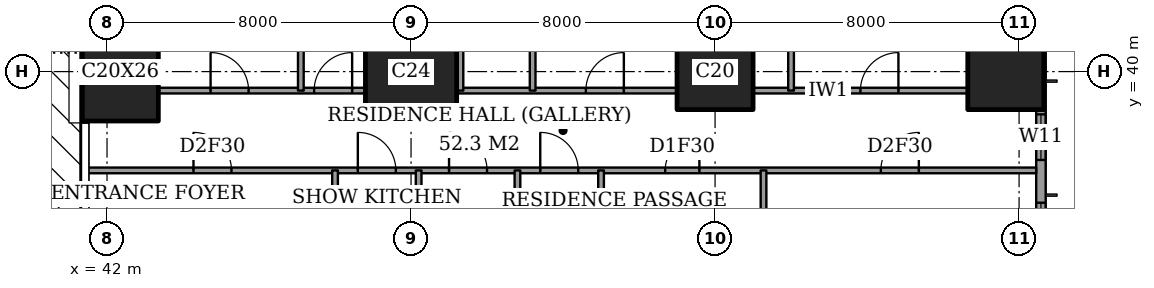
"""IFC4 building model, lengths in metres.
Left out: names, types, materials, properties, quantities, classifications, styles, units other than length and angle.
Written with IfcOpenShell. Run it as: python <this file> out.ifc"""

import sys

from ifc_helpers import new_model, si_unit, direction, frame, frame_2d, origin, origin_2d, place, context, subcontext, project, spatial, rectangle, extrude, element, fill, save


model = new_model("IFC4")
c1 = context("Model", 3, precision=1e-05, world=origin(), true_north=direction((0.0, 1.0)))
c2 = subcontext(c1, "Body", "Model", "MODEL_VIEW")
j1 = project(units=[si_unit("LENGTHUNIT", "METRE"), si_unit("PLANEANGLEUNIT", "RADIAN")], contexts=[c1])
p1 = place(None, origin())
s1 = spatial("IfcSite", under=j1, at=p1, CompositionType="ELEMENT")
p2 = place(p1, origin())
s2 = spatial("IfcBuilding", under=s1, at=p2, CompositionType="ELEMENT")
p3 = place(p2, frame((0.0, 0.0, 96.2)))
s3 = spatial("IfcBuildingStorey", under=s2, at=p3, CompositionType="ELEMENT", Elevation=96.2)
p4 = place(p3, frame((42.35, 40.0, 0.0), z_axis=(0.0, 0.0, 1.0), x_axis=(1.0, 0.0, 0.0)))
e1 = element("IfcColumn", 1, at=p4, inside=s3, PredefinedType="COLUMN", context=c2, shape_type="SweptSolid", body=[
    extrude(rectangle(XDim=2.0, YDim=2.6, at=origin_2d()), origin(), (0.0, 0.0, 1.0), 3.6),
])
p5 = place(p3, frame((50.0, 40.0, 0.0), z_axis=(0.0, 0.0, 1.0), x_axis=(1.0, 0.0, 0.0)))
e2 = element("IfcColumn", 2, at=p5, inside=s3, PredefinedType="COLUMN", context=c2, shape_type="SweptSolid", body=[
    extrude(rectangle(XDim=2.4, YDim=2.4, at=origin_2d()), origin(), (0.0, 0.0, 1.0), 3.6),
])
for number, where, z_axis, x_axis in (
    (3, (58.0, 40.0, 0.0), (0.0, 0.0, 1.0), (1.0, 0.0, 0.0)),
    (4, (65.65, 40.0, 0.0), (0.0, 0.0, 1.0), (1.0, 0.0, 0.0)),
):
    element("IfcColumn", number, at=place(p3, frame(where, z_axis=z_axis, x_axis=x_axis)), inside=s3, PredefinedType="COLUMN", context=c2, shape_type="SweptSolid", body=[
        extrude(rectangle(XDim=2.0, YDim=2.0, at=origin_2d()), origin(), (0.0, 0.0, 1.0), 3.6),
    ])
p6 = place(p3, frame((66.575, 3.175, 0.0), z_axis=(0.0, 0.0, 1.0), x_axis=(0.0, 1.0, 0.0)))
e5 = element("IfcWall", 5, at=p6, inside=s3, PredefinedType="SOLIDWALL", context=c2, shape_type="SweptSolid", body=[
    extrude(rectangle(XDim=41.65, YDim=0.25, at=frame_2d((20.825, 0.0))), origin(), (0.0, 0.0, 1.0), 3.6),
])
p7 = place(p6, frame((0.775, 0.0, 0.4)))
e6 = element("IfcOpeningElement", 6, at=p7, cuts=e5, PredefinedType="OPENING", context=c2, shape_type="SweptSolid", body=[
    extrude(rectangle(XDim=2.4, YDim=2.2, at=frame_2d((1.2, 1.1))), frame((0.0, 0.135, 0.0), z_axis=(0.0, -1.0, 0.0), x_axis=(1.0, 0.0, 0.0)), (0.0, 0.0, 1.0), 0.27),
])
p8 = place(p6, frame((6.1, 0.0, 0.4)))
e7 = element("IfcOpeningElement", 7, at=p8, cuts=e5, PredefinedType="OPENING", context=c2, shape_type="SweptSolid", body=[
    extrude(rectangle(XDim=1.2, YDim=2.2, at=frame_2d((0.6, 1.1))), frame((0.0, 0.135, 0.0), z_axis=(0.0, -1.0, 0.0), x_axis=(1.0, 0.0, 0.0)), (0.0, 0.0, 1.0), 0.27),
])
p9 = place(p6, frame((8.275, 0.0, 0.4)))
e8 = element("IfcOpeningElement", 8, at=p9, cuts=e5, PredefinedType="OPENING", context=c2, shape_type="SweptSolid", body=[
    extrude(rectangle(XDim=2.4, YDim=2.2, at=frame_2d((1.2, 1.1))), frame((0.0, 0.135, 0.0), z_axis=(0.0, -1.0, 0.0), x_axis=(1.0, 0.0, 0.0)), (0.0, 0.0, 1.0), 0.27),
])
p10 = place(p6, frame((15.775, 0.0, 0.4)))
e9 = element("IfcOpeningElement", 9, at=p10, cuts=e5, PredefinedType="OPENING", context=c2, shape_type="SweptSolid", body=[
    extrude(rectangle(XDim=2.4, YDim=2.2, at=frame_2d((1.2, 1.1))), frame((0.0, 0.135, 0.0), z_axis=(0.0, -1.0, 0.0), x_axis=(1.0, 0.0, 0.0)), (0.0, 0.0, 1.0), 0.27),
])
p11 = place(p6, frame((23.475, 0.0, 0.4)))
e10 = element("IfcOpeningElement", 10, at=p11, cuts=e5, PredefinedType="OPENING", context=c2, shape_type="SweptSolid", body=[
    extrude(rectangle(XDim=2.4, YDim=2.2, at=frame_2d((1.2, 1.1))), frame((0.0, 0.135, 0.0), z_axis=(0.0, -1.0, 0.0), x_axis=(1.0, 0.0, 0.0)), (0.0, 0.0, 1.0), 0.27),
])
p12 = place(p6, frame((30.975, 0.0, 0.4)))
e11 = element("IfcOpeningElement", 11, at=p12, cuts=e5, PredefinedType="OPENING", context=c2, shape_type="SweptSolid", body=[
    extrude(rectangle(XDim=2.4, YDim=2.2, at=frame_2d((1.2, 1.1))), frame((0.0, 0.135, 0.0), z_axis=(0.0, -1.0, 0.0), x_axis=(1.0, 0.0, 0.0)), (0.0, 0.0, 1.0), 0.27),
])
p13 = place(p6, frame((34.5, 0.0, 0.4)))
e12 = element("IfcOpeningElement", 12, at=p13, cuts=e5, PredefinedType="OPENING", context=c2, shape_type="SweptSolid", body=[
    extrude(rectangle(XDim=1.2, YDim=2.2, at=frame_2d((0.6, 1.1))), frame((0.0, 0.135, 0.0), z_axis=(0.0, -1.0, 0.0), x_axis=(1.0, 0.0, 0.0)), (0.0, 0.0, 1.0), 0.27),
])
p14 = place(p6, frame((38.475, 0.0, 0.4)))
e13 = element("IfcOpeningElement", 13, at=p14, cuts=e5, PredefinedType="OPENING", context=c2, shape_type="SweptSolid", body=[
    extrude(rectangle(XDim=2.4, YDim=2.2, at=frame_2d((1.2, 1.1))), frame((0.0, 0.135, 0.0), z_axis=(0.0, -1.0, 0.0), x_axis=(1.0, 0.0, 0.0)), (0.0, 0.0, 1.0), 0.27),
])
p15 = place(p3, frame((41.439, 37.4, 0.0), z_axis=(0.0, 0.0, 1.0), x_axis=(1.0, 0.0, 0.0)))
e14 = element("IfcWall", 14, at=p15, inside=s3, PredefinedType="PARTITIONING", context=c2, shape_type="SweptSolid", body=[
    extrude(rectangle(XDim=25.011, YDim=0.15, at=frame_2d((12.505, 0.0))), origin(), (0.0, 0.0, 1.0), 3.35),
])
p16 = place(p15, frame((11.961, 0.0, 0.0)))
e15 = element("IfcOpeningElement", 15, at=p16, cuts=e14, PredefinedType="OPENING", context=c2, shape_type="SweptSolid", body=[
    extrude(rectangle(XDim=1.0, YDim=2.1, at=frame_2d((0.5, 1.05))), frame((0.0, 0.085, 0.0), z_axis=(0.0, -1.0, 0.0), x_axis=(1.0, 0.0, 0.0)), (0.0, 0.0, 1.0), 0.17),
])
p17 = place(p15, frame((20.924, 0.0, 0.0)))
e16 = element("IfcOpeningElement", 16, at=p17, cuts=e14, PredefinedType="OPENING", context=c2, shape_type="SweptSolid", body=[
    extrude(rectangle(XDim=1.0, YDim=2.1, at=frame_2d((0.5, 1.05))), frame((0.0, 0.085, 0.0), z_axis=(0.0, -1.0, 0.0), x_axis=(1.0, 0.0, 0.0)), (0.0, 0.0, 1.0), 0.17),
])
p18 = place(p15, frame((15.249, 0.0, 0.0)))
e17 = element("IfcOpeningElement", 17, at=p18, cuts=e14, PredefinedType="OPENING", context=c2, shape_type="SweptSolid", body=[
    extrude(rectangle(XDim=0.9, YDim=2.1, at=frame_2d((0.45, 1.05))), frame((0.0, 0.085, 0.0), z_axis=(0.0, -1.0, 0.0), x_axis=(1.0, 0.0, 0.0)), (0.0, 0.0, 1.0), 0.17),
])
p19 = place(p15, frame((9.561, 0.0, 0.0)))
e18 = element("IfcOpeningElement", 18, at=p19, cuts=e14, PredefinedType="OPENING", context=c2, shape_type="SweptSolid", body=[
    extrude(rectangle(XDim=1.0, YDim=2.1, at=frame_2d((0.5, 1.05))), frame((0.0, 0.085, 0.0), z_axis=(0.0, -1.0, 0.0), x_axis=(1.0, 0.0, 0.0)), (0.0, 0.0, 1.0), 0.17),
])
p20 = place(p15, frame((7.161, 0.0, 0.0)))
e19 = element("IfcOpeningElement", 19, at=p20, cuts=e14, PredefinedType="OPENING", context=c2, shape_type="SweptSolid", body=[
    extrude(rectangle(XDim=1.0, YDim=2.1, at=frame_2d((0.5, 1.05))), frame((0.0, 0.085, 0.0), z_axis=(0.0, -1.0, 0.0), x_axis=(1.0, 0.0, 0.0)), (0.0, 0.0, 1.0), 0.17),
])
p21 = place(p15, frame((2.836, 0.0, 0.0)))
e20 = element("IfcOpeningElement", 20, at=p21, cuts=e14, PredefinedType="OPENING", context=c2, shape_type="SweptSolid", body=[
    extrude(rectangle(XDim=1.0, YDim=2.1, at=frame_2d((0.5, 1.05))), frame((0.0, 0.085, 0.0), z_axis=(0.0, -1.0, 0.0), x_axis=(1.0, 0.0, 0.0)), (0.0, 0.0, 1.0), 0.17),
])
p22 = place(p3, frame((43.35, 39.5, 0.0), z_axis=(0.0, 0.0, 1.0), x_axis=(1.0, 0.0, 0.0)))
e21 = element("IfcWall", 21, at=p22, inside=s3, PredefinedType="PARTITIONING", context=c2, shape_type="SweptSolid", body=[
    extrude(rectangle(XDim=5.45, YDim=0.15, at=frame_2d((2.725, 0.0))), origin(), (0.0, 0.0, 1.0), 3.35),
])
p23 = place(p22, frame((4.1, 0.0, 0.0)))
e22 = element("IfcOpeningElement", 22, at=p23, cuts=e21, PredefinedType="OPENING", context=c2, shape_type="SweptSolid", body=[
    extrude(rectangle(XDim=1.0, YDim=2.1, at=frame_2d((0.5, 1.05))), frame((0.0, 0.085, 0.0), z_axis=(0.0, -1.0, 0.0), x_axis=(1.0, 0.0, 0.0)), (0.0, 0.0, 1.0), 0.17),
])
p24 = place(p22, frame((1.375, 0.0, 0.0)))
e23 = element("IfcOpeningElement", 23, at=p24, cuts=e21, PredefinedType="OPENING", context=c2, shape_type="SweptSolid", body=[
    extrude(rectangle(XDim=1.0, YDim=2.1, at=frame_2d((0.5, 1.05))), frame((0.0, 0.085, 0.0), z_axis=(0.0, -1.0, 0.0), x_axis=(1.0, 0.0, 0.0)), (0.0, 0.0, 1.0), 0.17),
])
p25 = place(p3, frame((51.2, 39.5, 0.0), z_axis=(0.0, 0.0, 1.0), x_axis=(1.0, 0.0, 0.0)))
e24 = element("IfcWall", 24, at=p25, inside=s3, PredefinedType="PARTITIONING", context=c2, shape_type="SweptSolid", body=[
    extrude(rectangle(XDim=5.8, YDim=0.15, at=frame_2d((2.9, 0.0))), origin(), (0.0, 0.0, 1.0), 3.35),
])
p26 = place(p25, frame((3.4, 0.0, 0.0)))
e25 = element("IfcOpeningElement", 25, at=p26, cuts=e24, PredefinedType="OPENING", context=c2, shape_type="SweptSolid", body=[
    extrude(rectangle(XDim=1.0, YDim=2.1, at=frame_2d((0.5, 1.05))), frame((0.0, 0.085, 0.0), z_axis=(0.0, -1.0, 0.0), x_axis=(1.0, 0.0, 0.0)), (0.0, 0.0, 1.0), 0.17),
])
p27 = place(p3, frame((59.0, 39.5, 0.0), z_axis=(0.0, 0.0, 1.0), x_axis=(1.0, 0.0, 0.0)))
e26 = element("IfcWall", 26, at=p27, inside=s3, PredefinedType="PARTITIONING", context=c2, shape_type="SweptSolid", body=[
    extrude(rectangle(XDim=5.65, YDim=0.15, at=frame_2d((2.825, 0.0))), origin(), (0.0, 0.0, 1.0), 3.35),
])
p28 = place(p27, frame((2.825, 0.0, 0.0)))
e27 = element("IfcOpeningElement", 27, at=p28, cuts=e26, PredefinedType="OPENING", context=c2, shape_type="SweptSolid", body=[
    extrude(rectangle(XDim=1.0, YDim=2.1, at=frame_2d((0.5, 1.05))), frame((0.0, 0.085, 0.0), z_axis=(0.0, -1.0, 0.0), x_axis=(1.0, 0.0, 0.0)), (0.0, 0.0, 1.0), 0.17),
])
p29 = place(p3, frame((47.1, 39.5, 0.0), z_axis=(0.0, 0.0, 1.0), x_axis=(0.0, 1.0, 0.0)))
e28 = element("IfcWall", 28, at=p29, inside=s3, PredefinedType="PARTITIONING", context=c2, shape_type="SweptSolid", body=[
    extrude(rectangle(XDim=8.95, YDim=0.15, at=frame_2d((4.475, 0.0))), origin(), (0.0, 0.0, 1.0), 3.35),
])
p30 = place(p3, frame((48.0, 28.0, 0.0), z_axis=(0.0, 0.0, 1.0), x_axis=(0.0, 1.0, 0.0)))
e29 = element("IfcWall", 29, at=p30, inside=s3, PredefinedType="PARTITIONING", context=c2, shape_type="SweptSolid", body=[
    extrude(rectangle(XDim=9.4, YDim=0.15, at=frame_2d((4.7, 0.0))), origin(), (0.0, 0.0, 1.0), 3.35),
])
p31 = place(p30, frame((0.5, 0.0, 0.0)))
e30 = element("IfcOpeningElement", 30, at=p31, cuts=e29, PredefinedType="OPENING", context=c2, shape_type="SweptSolid", body=[
    extrude(rectangle(XDim=1.0, YDim=2.1, at=frame_2d((0.5, 1.05))), frame((0.0, 0.085, 0.0), z_axis=(0.0, -1.0, 0.0), x_axis=(1.0, 0.0, 0.0)), (0.0, 0.0, 1.0), 0.17),
])
p32 = place(p3, frame((50.2, 33.2, 0.0), z_axis=(0.0, 0.0, 1.0), x_axis=(0.0, 1.0, 0.0)))
e31 = element("IfcWall", 31, at=p32, inside=s3, PredefinedType="PARTITIONING", context=c2, shape_type="SweptSolid", body=[
    extrude(rectangle(XDim=4.2, YDim=0.15, at=frame_2d((2.1, 0.0))), origin(), (0.0, 0.0, 1.0), 3.35),
])
p33 = place(p3, frame((51.3, 39.5, 0.0), z_axis=(0.0, 0.0, 1.0), x_axis=(0.0, 1.0, 0.0)))
e32 = element("IfcWall", 32, at=p33, inside=s3, PredefinedType="PARTITIONING", context=c2, shape_type="SweptSolid", body=[
    extrude(rectangle(XDim=8.95, YDim=0.15, at=frame_2d((4.475, 0.0))), origin(), (0.0, 0.0, 1.0), 3.35),
])
p34 = place(p33, frame((4.025, 0.0, 0.0)))
e33 = element("IfcOpeningElement", 33, at=p34, cuts=e32, PredefinedType="OPENING", context=c2, shape_type="SweptSolid", body=[
    extrude(rectangle(XDim=0.9, YDim=2.1, at=frame_2d((0.45, 1.05))), frame((0.0, 0.085, 0.0), z_axis=(0.0, -1.0, 0.0), x_axis=(1.0, 0.0, 0.0)), (0.0, 0.0, 1.0), 0.17),
])
p35 = place(p3, frame((52.8, 30.0, 0.0), z_axis=(0.0, 0.0, 1.0), x_axis=(0.0, 1.0, 0.0)))
e34 = element("IfcWall", 34, at=p35, inside=s3, PredefinedType="PARTITIONING", context=c2, shape_type="SweptSolid", body=[
    extrude(rectangle(XDim=7.4, YDim=0.15, at=frame_2d((3.7, 0.0))), origin(), (0.0, 0.0, 1.0), 3.35),
])
p36 = place(p3, frame((53.2, 39.5, 0.0), z_axis=(0.0, 0.0, 1.0), x_axis=(0.0, 1.0, 0.0)))
e35 = element("IfcWall", 35, at=p36, inside=s3, PredefinedType="PARTITIONING", context=c2, shape_type="SweptSolid", body=[
    extrude(rectangle(XDim=8.95, YDim=0.15, at=frame_2d((4.475, 0.0))), origin(), (0.0, 0.0, 1.0), 3.35),
])
p37 = place(p3, frame((55.0, 28.0, 0.0), z_axis=(0.0, 0.0, 1.0), x_axis=(0.0, 1.0, 0.0)))
e36 = element("IfcWall", 36, at=p37, inside=s3, PredefinedType="PARTITIONING", context=c2, shape_type="SweptSolid", body=[
    extrude(rectangle(XDim=9.4, YDim=0.15, at=frame_2d((4.7, 0.0))), origin(), (0.0, 0.0, 1.0), 3.35),
])
p38 = place(p37, frame((0.5, 0.0, 0.0)))
e37 = element("IfcOpeningElement", 37, at=p38, cuts=e36, PredefinedType="OPENING", context=c2, shape_type="SweptSolid", body=[
    extrude(rectangle(XDim=1.0, YDim=2.1, at=frame_2d((0.5, 1.05))), frame((0.0, 0.085, 0.0), z_axis=(0.0, -1.0, 0.0), x_axis=(1.0, 0.0, 0.0)), (0.0, 0.0, 1.0), 0.17),
])
p39 = place(p3, frame((59.275, 33.2, 0.0), z_axis=(0.0, 0.0, 1.0), x_axis=(0.0, 1.0, 0.0)))
e38 = element("IfcWall", 38, at=p39, inside=s3, PredefinedType="PARTITIONING", context=c2, shape_type="SweptSolid", body=[
    extrude(rectangle(XDim=4.2, YDim=0.15, at=frame_2d((2.1, 0.0))), origin(), (0.0, 0.0, 1.0), 3.35),
])
p40 = place(p3, frame((60.0, 39.5, 0.0), z_axis=(0.0, 0.0, 1.0), x_axis=(0.0, 1.0, 0.0)))
e39 = element("IfcWall", 39, at=p40, inside=s3, PredefinedType="PARTITIONING", context=c2, shape_type="SweptSolid", body=[
    extrude(rectangle(XDim=8.95, YDim=0.15, at=frame_2d((4.475, 0.0))), origin(), (0.0, 0.0, 1.0), 3.35),
])
p41 = place(p12, origin())
e40 = element("IfcWindow", 40, at=p41, inside=s3, PartitioningType="SINGLE_PANEL", PredefinedType="WINDOW", context=c2, shape_type="SweptSolid", body=[
    extrude(rectangle(XDim=2.4, YDim=2.2, at=frame_2d((1.2, 1.1))), frame((0.0, 0.03, 0.0), z_axis=(0.0, -1.0, 0.0), x_axis=(1.0, 0.0, 0.0)), (0.0, 0.0, 1.0), 0.06),
])
fill(e11, e40)
p42 = place(p13, origin())
e41 = element("IfcWindow", 41, at=p42, inside=s3, PartitioningType="SINGLE_PANEL", PredefinedType="WINDOW", context=c2, shape_type="SweptSolid", body=[
    extrude(rectangle(XDim=1.2, YDim=2.2, at=frame_2d((0.6, 1.1))), frame((0.0, 0.03, 0.0), z_axis=(0.0, -1.0, 0.0), x_axis=(1.0, 0.0, 0.0)), (0.0, 0.0, 1.0), 0.06),
])
fill(e12, e41)
p43 = place(p28, origin())
e42 = element("IfcDoor", 42, at=p43, inside=s3, OperationType="SINGLE_SWING_LEFT", PredefinedType="DOOR", context=c2, shape_type="SweptSolid", body=[
    extrude(rectangle(XDim=1.0, YDim=2.1, at=frame_2d((0.5, 1.05))), frame((0.0, 0.025, 0.0), z_axis=(0.0, -1.0, 0.0), x_axis=(1.0, 0.0, 0.0)), (0.0, 0.0, 1.0), 0.05),
])
fill(e27, e42)
p44 = place(p26, origin())
e43 = element("IfcDoor", 43, at=p44, inside=s3, OperationType="SINGLE_SWING_LEFT", PredefinedType="DOOR", context=c2, shape_type="SweptSolid", body=[
    extrude(rectangle(XDim=1.0, YDim=2.1, at=frame_2d((0.5, 1.05))), frame((0.0, 0.025, 0.0), z_axis=(0.0, -1.0, 0.0), x_axis=(1.0, 0.0, 0.0)), (0.0, 0.0, 1.0), 0.05),
])
fill(e25, e43)
p45 = place(p23, origin())
e44 = element("IfcDoor", 44, at=p45, inside=s3, OperationType="SINGLE_SWING_LEFT", PredefinedType="DOOR", context=c2, shape_type="SweptSolid", body=[
    extrude(rectangle(XDim=1.0, YDim=2.1, at=frame_2d((0.5, 1.05))), frame((0.0, 0.025, 0.0), z_axis=(0.0, -1.0, 0.0), x_axis=(1.0, 0.0, 0.0)), (0.0, 0.0, 1.0), 0.05),
])
fill(e22, e44)
p46 = place(p24, origin())
e45 = element("IfcDoor", 45, at=p46, inside=s3, OperationType="SINGLE_SWING_RIGHT", PredefinedType="DOOR", context=c2, shape_type="SweptSolid", body=[
    extrude(rectangle(XDim=1.0, YDim=2.1, at=frame_2d((0.5, 1.05))), frame((0.0, 0.025, 0.0), z_axis=(0.0, -1.0, 0.0), x_axis=(1.0, 0.0, 0.0)), (0.0, 0.0, 1.0), 0.05),
])
fill(e23, e45)
p47 = place(p16, origin())
e46 = element("IfcDoor", 46, at=p47, inside=s3, OperationType="SINGLE_SWING_RIGHT", PredefinedType="DOOR", context=c2, shape_type="SweptSolid", body=[
    extrude(rectangle(XDim=1.0, YDim=2.1, at=frame_2d((0.5, 1.05))), frame((0.0, 0.025, 0.0), z_axis=(0.0, -1.0, 0.0), x_axis=(1.0, 0.0, 0.0)), (0.0, 0.0, 1.0), 0.05),
])
fill(e15, e46)
p48 = place(p17, origin())
e47 = element("IfcDoor", 47, at=p48, inside=s3, OperationType="SINGLE_SWING_LEFT", PredefinedType="DOOR", context=c2, shape_type="SweptSolid", body=[
    extrude(rectangle(XDim=1.0, YDim=2.1, at=frame_2d((0.5, 1.05))), frame((0.0, 0.025, 0.0), z_axis=(0.0, -1.0, 0.0), x_axis=(1.0, 0.0, 0.0)), (0.0, 0.0, 1.0), 0.05),
])
fill(e16, e47)
p49 = place(p18, origin())
e48 = element("IfcDoor", 48, at=p49, inside=s3, OperationType="SINGLE_SWING_LEFT", PredefinedType="DOOR", context=c2, shape_type="SweptSolid", body=[
    extrude(rectangle(XDim=0.9, YDim=2.1, at=frame_2d((0.45, 1.05))), frame((0.0, 0.025, 0.0), z_axis=(0.0, -1.0, 0.0), x_axis=(1.0, 0.0, 0.0)), (0.0, 0.0, 1.0), 0.05),
])
fill(e17, e48)
p50 = place(p19, origin())
e49 = element("IfcDoor", 49, at=p50, inside=s3, OperationType="SINGLE_SWING_RIGHT", PredefinedType="DOOR", context=c2, shape_type="SweptSolid", body=[
    extrude(rectangle(XDim=1.0, YDim=2.1, at=frame_2d((0.5, 1.05))), frame((0.0, 0.025, 0.0), z_axis=(0.0, -1.0, 0.0), x_axis=(1.0, 0.0, 0.0)), (0.0, 0.0, 1.0), 0.05),
])
fill(e18, e49)
p51 = place(p20, origin())
e50 = element("IfcDoor", 50, at=p51, inside=s3, OperationType="SINGLE_SWING_RIGHT", PredefinedType="DOOR", context=c2, shape_type="SweptSolid", body=[
    extrude(rectangle(XDim=1.0, YDim=2.1, at=frame_2d((0.5, 1.05))), frame((0.0, 0.025, 0.0), z_axis=(0.0, -1.0, 0.0), x_axis=(1.0, 0.0, 0.0)), (0.0, 0.0, 1.0), 0.05),
])
fill(e19, e50)
p52 = place(p21, origin())
e51 = element("IfcDoor", 51, at=p52, inside=s3, OperationType="SINGLE_SWING_RIGHT", PredefinedType="DOOR", context=c2, shape_type="SweptSolid", body=[
    extrude(rectangle(XDim=1.0, YDim=2.1, at=frame_2d((0.5, 1.05))), frame((0.0, 0.025, 0.0), z_axis=(0.0, -1.0, 0.0), x_axis=(1.0, 0.0, 0.0)), (0.0, 0.0, 1.0), 0.05),
])
fill(e20, e51)
save(model, sys.argv[1])
